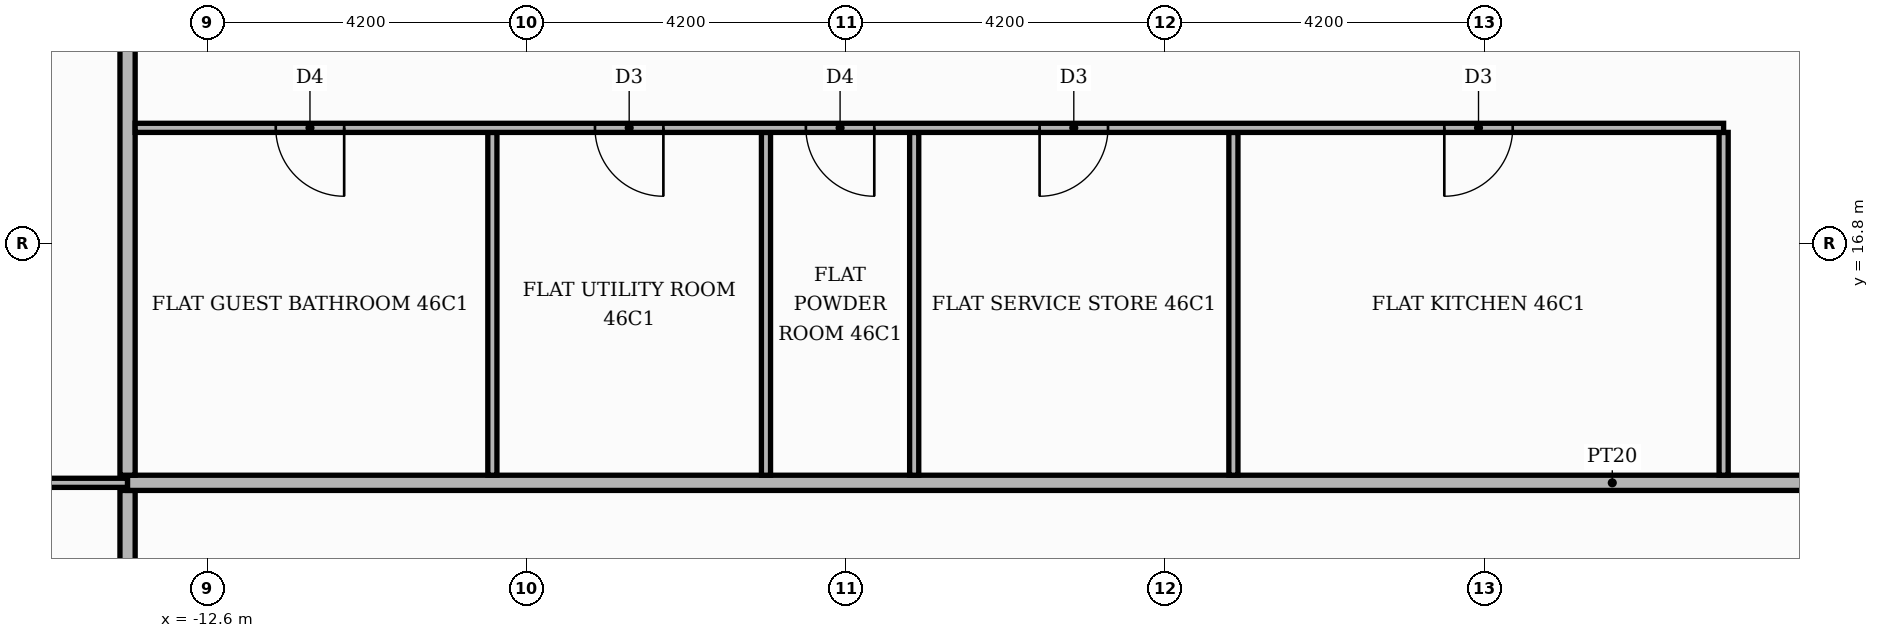
"""IFC4 building model, lengths in metres.
Left out: names, types, materials, properties, quantities, classifications, styles, units other than length and angle.
Written with IfcOpenShell. Run it as: python <this file> out.ifc"""

import sys

from ifc_helpers import new_model, si_unit, direction, frame, frame_2d, origin, place, context, subcontext, project, spatial, rectangle, extrude, element, fill, save


model = new_model("IFC4")
c1 = context("Model", 3, precision=1e-05, world=origin(), true_north=direction((0.0, 1.0)))
c2 = subcontext(c1, "Body", "Model", "MODEL_VIEW")
j1 = project(units=[si_unit("LENGTHUNIT", "METRE"), si_unit("PLANEANGLEUNIT", "RADIAN")], contexts=[c1])
p1 = place(None, origin())
s1 = spatial("IfcSite", under=j1, at=p1, CompositionType="ELEMENT")
p2 = place(p1, origin())
s2 = spatial("IfcBuilding", under=s1, at=p2, CompositionType="ELEMENT")
p3 = place(p2, frame((0.0, 0.0, 196.2)))
s3 = spatial("IfcBuildingStorey", under=s2, at=p3, CompositionType="ELEMENT", Elevation=196.2)
p4 = place(p3, frame((-13.65, -13.55, 0.0), z_axis=(0.0, 0.0, 1.0), x_axis=(0.0, 1.0, 0.0)))
e1 = element("IfcWall", 1, at=p4, inside=s3, PredefinedType="PARTITIONING", context=c2, shape_type="SweptSolid", body=[
    extrude(rectangle(XDim=27.1, YDim=0.2, at=frame_2d((13.55, 0.0))), origin(), (0.0, 0.0, 1.0), 3.48),
])
p5 = place(p4, frame((23.5, 0.0, 0.0)))
e2 = element("IfcOpeningElement", 2, at=p5, cuts=e1, PredefinedType="OPENING", context=c2, shape_type="SweptSolid", body=[
    extrude(rectangle(XDim=1.1, YDim=2.4, at=frame_2d((0.55, 1.2))), frame((0.0, 0.11, 0.0), z_axis=(0.0, -1.0, 0.0), x_axis=(1.0, 0.0, 0.0)), (0.0, 0.0, 1.0), 0.22),
])
p6 = place(p3, frame((-20.12, 13.65, 0.0), z_axis=(0.0, 0.0, 1.0), x_axis=(1.0, 0.0, 0.0)))
e3 = element("IfcWall", 3, at=p6, inside=s3, PredefinedType="PARTITIONING", context=c2, shape_type="SweptSolid", body=[
    extrude(rectangle(XDim=6.47, YDim=0.12, at=frame_2d((3.235, 0.0))), origin(), (0.0, 0.0, 1.0), 3.48),
])
p7 = place(p6, frame((2.785, 0.0, 0.0)))
e4 = element("IfcOpeningElement", 4, at=p7, cuts=e3, PredefinedType="OPENING", context=c2, shape_type="SweptSolid", body=[
    extrude(rectangle(XDim=0.9, YDim=2.1, at=frame_2d((0.45, 1.05))), frame((0.0, 0.07, 0.0), z_axis=(0.0, -1.0, 0.0), x_axis=(1.0, 0.0, 0.0)), (0.0, 0.0, 1.0), 0.14),
])
p8 = place(p3, frame((-13.65, 13.65, 0.0), z_axis=(0.0, 0.0, 1.0), x_axis=(1.0, 0.0, 0.0)))
e5 = element("IfcWall", 5, at=p8, inside=s3, PredefinedType="PARTITIONING", context=c2, shape_type="SweptSolid", body=[
    extrude(rectangle(XDim=39.07, YDim=0.2, at=frame_2d((19.535, 0.0))), origin(), (0.0, 0.0, 1.0), 3.48),
])
p9 = place(p8, frame((23.6, 0.0, 0.0)))
e6 = element("IfcOpeningElement", 6, at=p9, cuts=e5, PredefinedType="OPENING", context=c2, shape_type="SweptSolid", body=[
    extrude(rectangle(XDim=1.1, YDim=2.4, at=frame_2d((0.55, 1.2))), frame((0.0, 0.11, 0.0), z_axis=(0.0, -1.0, 0.0), x_axis=(1.0, 0.0, 0.0)), (0.0, 0.0, 1.0), 0.22),
])
p10 = place(p3, frame((-13.65, 13.75, 0.0), z_axis=(0.0, 0.0, 1.0), x_axis=(0.0, 1.0, 0.0)))
e7 = element("IfcWall", 7, at=p10, inside=s3, PredefinedType="PARTITIONING", context=c2, shape_type="SweptSolid", body=[
    extrude(rectangle(XDim=11.67, YDim=0.2, at=frame_2d((5.835, 0.0))), origin(), (0.0, 0.0, 1.0), 3.48),
])
for number, where, z_axis, x_axis in (
    (8, (-8.85, 13.75, 0.0), (0.0, 0.0, 1.0), (0.0, 1.0, 0.0)),
    (9, (-5.25, 13.75, 0.0), (0.0, 0.0, 1.0), (0.0, 1.0, 0.0)),
    (10, (-3.3, 13.75, 0.0), (0.0, 0.0, 1.0), (0.0, 1.0, 0.0)),
    (11, (0.9, 13.75, 0.0), (0.0, 0.0, 1.0), (0.0, 1.0, 0.0)),
    (12, (7.35, 13.75, 0.0), (0.0, 0.0, 1.0), (0.0, 1.0, 0.0)),
):
    element("IfcWall", number, at=place(p3, frame(where, z_axis=z_axis, x_axis=x_axis)), inside=s3, PredefinedType="PARTITIONING", context=c2, shape_type="SweptSolid", body=[
        extrude(rectangle(XDim=4.51, YDim=0.12, at=frame_2d((2.255, 0.0))), origin(), (0.0, 0.0, 1.0), 3.48),
    ])
p11 = place(p3, frame((-13.55, 18.32, 0.0), z_axis=(0.0, 0.0, 1.0), x_axis=(1.0, 0.0, 0.0)))
e13 = element("IfcWall", 13, at=p11, inside=s3, PredefinedType="PARTITIONING", context=c2, shape_type="SweptSolid", body=[
    extrude(rectangle(XDim=20.9, YDim=0.12, at=frame_2d((10.45, 0.0))), origin(), (0.0, 0.0, 1.0), 3.48),
])
p12 = place(p11, frame((17.225, 0.0, 0.0)))
e14 = element("IfcOpeningElement", 14, at=p12, cuts=e13, PredefinedType="OPENING", context=c2, shape_type="SweptSolid", body=[
    extrude(rectangle(XDim=0.9, YDim=2.1, at=frame_2d((0.45, 1.05))), frame((0.0, 0.07, 0.0), z_axis=(0.0, -1.0, 0.0), x_axis=(1.0, 0.0, 0.0)), (0.0, 0.0, 1.0), 0.14),
])
p13 = place(p11, frame((11.9, 0.0, 0.0)))
e15 = element("IfcOpeningElement", 15, at=p13, cuts=e13, PredefinedType="OPENING", context=c2, shape_type="SweptSolid", body=[
    extrude(rectangle(XDim=0.9, YDim=2.1, at=frame_2d((0.45, 1.05))), frame((0.0, 0.07, 0.0), z_axis=(0.0, -1.0, 0.0), x_axis=(1.0, 0.0, 0.0)), (0.0, 0.0, 1.0), 0.14),
])
p14 = place(p11, frame((8.825, 0.0, 0.0)))
e16 = element("IfcOpeningElement", 16, at=p14, cuts=e13, PredefinedType="OPENING", context=c2, shape_type="SweptSolid", body=[
    extrude(rectangle(XDim=0.9, YDim=2.1, at=frame_2d((0.45, 1.05))), frame((0.0, 0.07, 0.0), z_axis=(0.0, -1.0, 0.0), x_axis=(1.0, 0.0, 0.0)), (0.0, 0.0, 1.0), 0.14),
])
p15 = place(p11, frame((6.05, 0.0, 0.0)))
e17 = element("IfcOpeningElement", 17, at=p15, cuts=e13, PredefinedType="OPENING", context=c2, shape_type="SweptSolid", body=[
    extrude(rectangle(XDim=0.9, YDim=2.1, at=frame_2d((0.45, 1.05))), frame((0.0, 0.07, 0.0), z_axis=(0.0, -1.0, 0.0), x_axis=(1.0, 0.0, 0.0)), (0.0, 0.0, 1.0), 0.14),
])
p16 = place(p11, frame((1.85, 0.0, 0.0)))
e18 = element("IfcOpeningElement", 18, at=p16, cuts=e13, PredefinedType="OPENING", context=c2, shape_type="SweptSolid", body=[
    extrude(rectangle(XDim=0.9, YDim=2.1, at=frame_2d((0.45, 1.05))), frame((0.0, 0.07, 0.0), z_axis=(0.0, -1.0, 0.0), x_axis=(1.0, 0.0, 0.0)), (0.0, 0.0, 1.0), 0.14),
])
p17 = place(p12, frame((0.9, 0.0, 0.0), z_axis=(0.0, 0.0, 1.0), x_axis=(-1.0, 0.0, 0.0)))
e19 = element("IfcDoor", 19, at=p17, inside=s3, OperationType="SINGLE_SWING_LEFT", PredefinedType="DOOR", context=c2, shape_type="SweptSolid", body=[
    extrude(rectangle(XDim=0.9, YDim=2.1, at=frame_2d((0.45, 1.05))), frame((0.0, 0.025, 0.0), z_axis=(0.0, -1.0, 0.0), x_axis=(1.0, 0.0, 0.0)), (0.0, 0.0, 1.0), 0.05),
])
fill(e14, e19)
p18 = place(p13, frame((0.9, 0.0, 0.0), z_axis=(0.0, 0.0, 1.0), x_axis=(-1.0, 0.0, 0.0)))
e20 = element("IfcDoor", 20, at=p18, inside=s3, OperationType="SINGLE_SWING_LEFT", PredefinedType="DOOR", context=c2, shape_type="SweptSolid", body=[
    extrude(rectangle(XDim=0.9, YDim=2.1, at=frame_2d((0.45, 1.05))), frame((0.0, 0.025, 0.0), z_axis=(0.0, -1.0, 0.0), x_axis=(1.0, 0.0, 0.0)), (0.0, 0.0, 1.0), 0.05),
])
fill(e15, e20)
p19 = place(p14, frame((0.9, 0.0, 0.0), z_axis=(0.0, 0.0, 1.0), x_axis=(-1.0, 0.0, 0.0)))
e21 = element("IfcDoor", 21, at=p19, inside=s3, OperationType="SINGLE_SWING_RIGHT", PredefinedType="DOOR", context=c2, shape_type="SweptSolid", body=[
    extrude(rectangle(XDim=0.9, YDim=2.1, at=frame_2d((0.45, 1.05))), frame((0.0, 0.025, 0.0), z_axis=(0.0, -1.0, 0.0), x_axis=(1.0, 0.0, 0.0)), (0.0, 0.0, 1.0), 0.05),
])
fill(e16, e21)
p20 = place(p15, frame((0.9, 0.0, 0.0), z_axis=(0.0, 0.0, 1.0), x_axis=(-1.0, 0.0, 0.0)))
e22 = element("IfcDoor", 22, at=p20, inside=s3, OperationType="SINGLE_SWING_RIGHT", PredefinedType="DOOR", context=c2, shape_type="SweptSolid", body=[
    extrude(rectangle(XDim=0.9, YDim=2.1, at=frame_2d((0.45, 1.05))), frame((0.0, 0.025, 0.0), z_axis=(0.0, -1.0, 0.0), x_axis=(1.0, 0.0, 0.0)), (0.0, 0.0, 1.0), 0.05),
])
fill(e17, e22)
p21 = place(p16, frame((0.9, 0.0, 0.0), z_axis=(0.0, 0.0, 1.0), x_axis=(-1.0, 0.0, 0.0)))
e23 = element("IfcDoor", 23, at=p21, inside=s3, OperationType="SINGLE_SWING_RIGHT", PredefinedType="DOOR", context=c2, shape_type="SweptSolid", body=[
    extrude(rectangle(XDim=0.9, YDim=2.1, at=frame_2d((0.45, 1.05))), frame((0.0, 0.025, 0.0), z_axis=(0.0, -1.0, 0.0), x_axis=(1.0, 0.0, 0.0)), (0.0, 0.0, 1.0), 0.05),
])
fill(e18, e23)
save(model, sys.argv[1])
